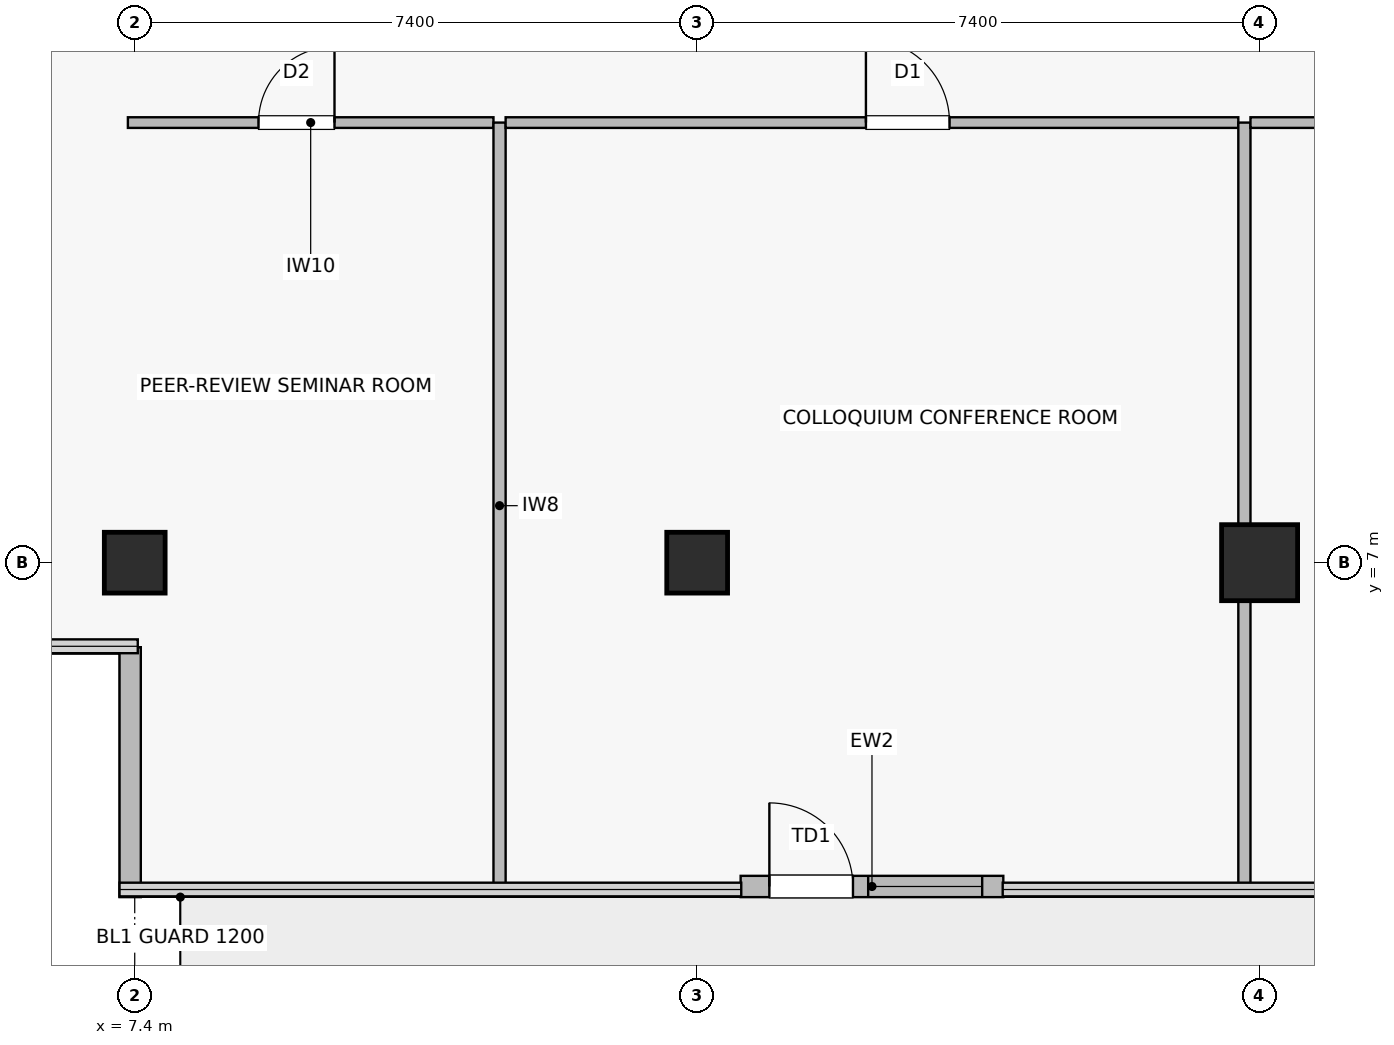
"""IFC4 building model, lengths in metres.
Left out: names, types, materials, properties, quantities, classifications, styles, units other than length and angle.
Written with IfcOpenShell. Run it as: python <this file> out.ifc"""

import sys

from ifc_helpers import new_model, si_unit, direction, frame, frame_2d, origin, origin_2d, place, context, subcontext, project, spatial, rectangle, extrude, source, transform, mapped, element, fill, save


model = new_model("IFC4")
c1 = context("Model", 3, precision=1e-05, world=origin(), true_north=direction((0.0, 1.0)))
c2 = subcontext(c1, "Body", "Model", "MODEL_VIEW")
j1 = project(units=[si_unit("LENGTHUNIT", "METRE"), si_unit("PLANEANGLEUNIT", "RADIAN")], contexts=[c1])
p1 = place(None, origin())
s1 = spatial("IfcSite", under=j1, at=p1, CompositionType="ELEMENT")
p2 = place(p1, origin())
s2 = spatial("IfcBuilding", under=s1, at=p2, CompositionType="ELEMENT")
p3 = place(p2, frame((0.0, 0.0, 205.5)))
s3 = spatial("IfcBuildingStorey", under=s2, at=p3, CompositionType="ELEMENT", Elevation=205.5)
m1 = source(origin(), c2, "Body", "SweptSolid", [
    extrude(rectangle(XDim=0.8, YDim=0.8, at=origin_2d()), origin(), (0.0, 0.0, 1.0), 4.1),
])
p4 = place(p3, frame((14.8, 7.0, 0.0), z_axis=(0.0, 0.0, 1.0), x_axis=(1.0, 0.0, 0.0)))
e1 = element("IfcColumn", 1, at=p4, inside=s3, PredefinedType="COLUMN", context=c2, shape_type="MappedRepresentation", body=[
    mapped(m1, transform((0.0, 0.0, 0.0), scale=1.0)),
])
m2 = source(origin(), c2, "Body", "SweptSolid", [
    extrude(rectangle(XDim=1.0, YDim=1.0, at=origin_2d()), origin(), (0.0, 0.0, 1.0), 4.1),
])
p5 = place(p3, frame((22.2, 7.0, 0.0), z_axis=(0.0, 0.0, 1.0), x_axis=(1.0, 0.0, 0.0)))
e2 = element("IfcColumn", 2, at=p5, inside=s3, PredefinedType="COLUMN", context=c2, shape_type="MappedRepresentation", body=[
    mapped(m2, transform((0.0, 0.0, 0.0), scale=1.0)),
])
p6 = place(p3, frame((7.4, 7.0, 0.0), z_axis=(0.0, 0.0, 1.0), x_axis=(1.0, 0.0, 0.0)))
e3 = element("IfcColumn", 3, at=p6, inside=s3, PredefinedType="COLUMN", context=c2, shape_type="MappedRepresentation", body=[
    mapped(m1, transform((0.0, 0.0, 0.0), scale=1.0)),
])
p7 = place(p3, frame((15.372, 2.74, 0.0), z_axis=(0.0, 0.0, 1.0), x_axis=(1.0, 0.0, 0.0)))
e4 = element("IfcWall", 4, at=p7, inside=s3, PredefinedType="STANDARD", context=c2, shape_type="SweptSolid", body=[
    extrude(rectangle(XDim=3.456, YDim=0.28, at=frame_2d((1.728, 0.0))), origin(), (0.0, 0.0, 1.0), 3.8),
])
p8 = place(p7, frame((0.378, 0.0, 0.0)))
e5 = element("IfcOpeningElement", 5, at=p8, cuts=e4, PredefinedType="OPENING", context=c2, shape_type="SweptSolid", body=[
    extrude(rectangle(XDim=1.1, YDim=2.2, at=frame_2d((0.55, 1.1))), frame((0.0, 0.15, 0.0), z_axis=(0.0, -1.0, 0.0), x_axis=(1.0, 0.0, 0.0)), (0.0, 0.0, 1.0), 0.3),
])
p9 = place(p7, frame((1.678, 0.0, 0.9)))
e6 = element("IfcOpeningElement", 6, at=p9, cuts=e4, PredefinedType="OPENING", context=c2, shape_type="SweptSolid", body=[
    extrude(rectangle(XDim=1.5, YDim=2.2, at=frame_2d((0.75, 1.1))), frame((0.0, 0.15, 0.0), z_axis=(0.0, -1.0, 0.0), x_axis=(1.0, 0.0, 0.0)), (0.0, 0.0, 1.0), 0.3),
])
p10 = place(p3, frame((7.34, 5.888, 0.0), z_axis=(0.0, 0.0, 1.0), x_axis=(0.0, -1.0, 0.0)))
e7 = element("IfcWall", 7, at=p10, inside=s3, PredefinedType="STANDARD", context=c2, shape_type="SweptSolid", body=[
    extrude(rectangle(XDim=3.288, YDim=0.28, at=frame_2d((1.644, 0.0))), origin(), (0.0, 0.0, 1.0), 3.8),
])
p11 = place(p3, frame((7.31, 12.79, 0.0), z_axis=(0.0, 0.0, 1.0), x_axis=(1.0, 0.0, 0.0)))
e8 = element("IfcWall", 8, at=p11, inside=s3, PredefinedType="PARTITIONING", context=c2, shape_type="SweptSolid", body=[
    extrude(rectangle(XDim=4.81, YDim=0.14, at=frame_2d((2.405, 0.0))), origin(), (0.0, 0.0, 1.0), 3.335),
])
p12 = place(p11, frame((1.719, 0.0, 0.0)))
e9 = element("IfcOpeningElement", 9, at=p12, cuts=e8, PredefinedType="OPENING", context=c2, shape_type="SweptSolid", body=[
    extrude(rectangle(XDim=1.0, YDim=2.15, at=frame_2d((0.5, 1.075))), frame((0.0, 0.08, 0.0), z_axis=(0.0, -1.0, 0.0), x_axis=(1.0, 0.0, 0.0)), (0.0, 0.0, 1.0), 0.16),
])
p13 = place(p3, frame((12.2, 2.71, 0.0), z_axis=(0.0, 0.0, 1.0), x_axis=(0.0, 1.0, 0.0)))
e10 = element("IfcWall", 10, at=p13, inside=s3, PredefinedType="PARTITIONING", context=c2, shape_type="SweptSolid", body=[
    extrude(rectangle(XDim=10.08, YDim=0.16, at=frame_2d((5.04, 0.0))), origin(), (0.0, 0.0, 1.0), 3.135),
])
p14 = place(p3, frame((12.28, 12.79, 0.0), z_axis=(0.0, 0.0, 1.0), x_axis=(1.0, 0.0, 0.0)))
e11 = element("IfcWall", 11, at=p14, inside=s3, PredefinedType="PARTITIONING", context=c2, shape_type="SweptSolid", body=[
    extrude(rectangle(XDim=9.64, YDim=0.14, at=frame_2d((4.82, 0.0))), origin(), (0.0, 0.0, 1.0), 3.197),
])
p15 = place(p14, frame((4.74, 0.0, 0.0)))
e12 = element("IfcOpeningElement", 12, at=p15, cuts=e11, PredefinedType="OPENING", context=c2, shape_type="SweptSolid", body=[
    extrude(rectangle(XDim=1.1, YDim=2.18, at=frame_2d((0.55, 1.09))), frame((0.0, 0.08, 0.0), z_axis=(0.0, -1.0, 0.0), x_axis=(1.0, 0.0, 0.0)), (0.0, 0.0, 1.0), 0.16),
])
p16 = place(p3, frame((22.0, 2.71, 0.0), z_axis=(0.0, 0.0, 1.0), x_axis=(0.0, 1.0, 0.0)))
e13 = element("IfcWall", 13, at=p16, inside=s3, PredefinedType="PARTITIONING", context=c2, shape_type="SweptSolid", body=[
    extrude(rectangle(XDim=10.08, YDim=0.16, at=frame_2d((5.04, 0.0))), origin(), (0.0, 0.0, 1.0), 3.135),
])
p17 = place(p3, frame((22.08, 12.79, 0.0), z_axis=(0.0, 0.0, 1.0), x_axis=(1.0, 0.0, 0.0)))
e14 = element("IfcWall", 14, at=p17, inside=s3, PredefinedType="PARTITIONING", context=c2, shape_type="SweptSolid", body=[
    extrude(rectangle(XDim=11.24, YDim=0.14, at=frame_2d((5.62, 0.0))), origin(), (0.0, 0.0, 1.0), 3.197),
])
p18 = place(p17, frame((4.504, 0.0, 0.0)))
e15 = element("IfcOpeningElement", 15, at=p18, cuts=e14, PredefinedType="OPENING", context=c2, shape_type="SweptSolid", body=[
    extrude(rectangle(XDim=1.1, YDim=2.18, at=frame_2d((0.55, 1.09))), frame((0.0, 0.08, 0.0), z_axis=(0.0, -1.0, 0.0), x_axis=(1.0, 0.0, 0.0)), (0.0, 0.0, 1.0), 0.16),
])
m3 = source(origin(), c2, "Body", "SweptSolid", [
    extrude(rectangle(XDim=1.1, YDim=2.2, at=frame_2d((0.55, 1.1))), frame((0.0, 0.025, 0.0), z_axis=(0.0, -1.0, 0.0), x_axis=(1.0, 0.0, 0.0)), (0.0, 0.0, 1.0), 0.05),
])
p19 = place(p8, origin())
e16 = element("IfcDoor", 16, at=p19, inside=s3, OperationType="SINGLE_SWING_LEFT", PredefinedType="DOOR", context=c2, shape_type="MappedRepresentation", body=[
    mapped(m3, transform((0.0, 0.0, 0.0), scale=1.0)),
])
fill(e5, e16)
m4 = source(origin(), c2, "Body", "SweptSolid", [
    extrude(rectangle(XDim=1.5, YDim=2.2, at=frame_2d((0.75, 1.1))), frame((0.0, 0.03, 0.0), z_axis=(0.0, -1.0, 0.0), x_axis=(1.0, 0.0, 0.0)), (0.0, 0.0, 1.0), 0.06),
])
p20 = place(p9, origin())
e17 = element("IfcWindow", 17, at=p20, inside=s3, PartitioningType="SINGLE_PANEL", PredefinedType="WINDOW", context=c2, shape_type="MappedRepresentation", body=[
    mapped(m4, transform((0.0, 0.0, 0.0), scale=1.0)),
])
fill(e6, e17)
m5 = source(origin(), c2, "Body", "SweptSolid", [
    extrude(rectangle(XDim=1.0, YDim=2.15, at=frame_2d((0.5, 1.075))), frame((0.0, 0.025, 0.0), z_axis=(0.0, -1.0, 0.0), x_axis=(1.0, 0.0, 0.0)), (0.0, 0.0, 1.0), 0.05),
])
p21 = place(p12, origin())
e18 = element("IfcDoor", 18, at=p21, inside=s3, OperationType="SINGLE_SWING_RIGHT", PredefinedType="DOOR", context=c2, shape_type="MappedRepresentation", body=[
    mapped(m5, transform((0.0, 0.0, 0.0), scale=1.0)),
])
fill(e9, e18)
m6 = source(origin(), c2, "Body", "SweptSolid", [
    extrude(rectangle(XDim=1.1, YDim=2.18, at=frame_2d((0.55, 1.09))), frame((0.0, 0.025, 0.0), z_axis=(0.0, -1.0, 0.0), x_axis=(1.0, 0.0, 0.0)), (0.0, 0.0, 1.0), 0.05),
])
p22 = place(p15, origin())
e19 = element("IfcDoor", 19, at=p22, inside=s3, OperationType="SINGLE_SWING_LEFT", PredefinedType="DOOR", context=c2, shape_type="MappedRepresentation", body=[
    mapped(m6, transform((0.0, 0.0, 0.0), scale=1.0)),
])
fill(e12, e19)
save(model, sys.argv[1])
